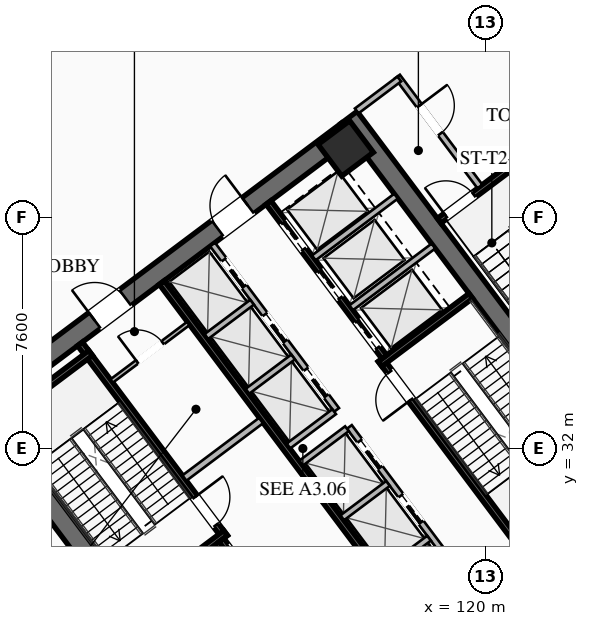
"""IFC4 building model, lengths in metres.
Left out: names, types, materials, properties, quantities, classifications, styles, units other than length and angle.
Written with IfcOpenShell. Run it as: python <this file> out.ifc"""

import sys

from ifc_helpers import new_model, si_unit, direction, frame, frame_2d, origin, origin_2d, place, context, subcontext, project, spatial, rectangle, hollow_rectangle, extrude, element, fill, save


model = new_model("IFC4")
c1 = context("Model", 3, precision=1e-05, world=origin(), true_north=direction((0.0, 1.0)))
c2 = subcontext(c1, "Body", "Model", "MODEL_VIEW")
j1 = project(units=[si_unit("LENGTHUNIT", "METRE"), si_unit("PLANEANGLEUNIT", "RADIAN")], contexts=[c1])
p1 = place(None, origin())
s1 = spatial("IfcSite", under=j1, at=p1, CompositionType="ELEMENT")
p2 = place(p1, origin())
s2 = spatial("IfcBuilding", under=s1, at=p2, CompositionType="ELEMENT")
p3 = place(p2, origin())
s3 = spatial("IfcBuildingStorey", under=s2, at=p3, CompositionType="ELEMENT", Elevation=0.0)
for number, where, z_axis, x_axis in (
    (1, (112.476, 21.107, 0.0), (0.0, 0.0, 1.0), (-0.6, 0.8, 0.0)),
    (2, (115.524, 42.893, 0.0), (0.0, 0.0, 1.0), (0.6, -0.8, 0.0)),
):
    element("IfcWall", number, at=place(p3, frame(where, z_axis=z_axis, x_axis=x_axis)), inside=s3, PredefinedType="SHEAR", context=c2, shape_type="SweptSolid", body=[
        extrude(rectangle(XDim=15.6, YDim=0.65, at=frame_2d((7.8, 0.0))), origin(), (0.0, 0.0, 1.0), 5.4),
    ])
p4 = place(p3, frame((124.429, 30.478, 0.0), z_axis=(0.0, 0.0, 1.0), x_axis=(-0.799998028465, -0.600002628705, 0.0)))
e3 = element("IfcWall", 3, at=p4, inside=s3, PredefinedType="SHEAR", context=c2, shape_type="SweptSolid", body=[
    extrude(rectangle(XDim=14.86, YDim=0.65, at=frame_2d((7.43, 0.0))), origin(), (0.0, 0.0, 1.0), 5.4),
])
p5 = place(p4, frame((9.13, 0.0, 0.0)))
e4 = element("IfcOpeningElement", 4, at=p5, cuts=e3, PredefinedType="OPENING", context=c2, shape_type="SweptSolid", body=[
    extrude(rectangle(XDim=1.25, YDim=2.25, at=frame_2d((0.625, 1.125))), frame((0.0, 0.335, 0.0), z_axis=(0.0, -1.0, 0.0), x_axis=(1.0, 0.0, 0.0)), (0.0, 0.0, 1.0), 0.67),
])
p6 = place(p4, frame((4.08, 0.0, 0.0)))
e5 = element("IfcOpeningElement", 5, at=p6, cuts=e3, PredefinedType="OPENING", context=c2, shape_type="SweptSolid", body=[
    extrude(rectangle(XDim=1.25, YDim=2.25, at=frame_2d((0.625, 1.125))), frame((0.0, 0.335, 0.0), z_axis=(0.0, -1.0, 0.0), x_axis=(1.0, 0.0, 0.0)), (0.0, 0.0, 1.0), 0.67),
])
p7 = place(p3, frame((103.571, 33.522, 0.0), z_axis=(0.0, 0.0, 1.0), x_axis=(0.799998028465, 0.600002628705, 0.0)))
e6 = element("IfcWall", 6, at=p7, inside=s3, PredefinedType="SHEAR", context=c2, shape_type="SweptSolid", body=[
    extrude(rectangle(XDim=14.86, YDim=0.65, at=frame_2d((7.43, 0.0))), origin(), (0.0, 0.0, 1.0), 5.4),
])
p8 = place(p7, frame((4.48, 0.0, 0.0)))
e7 = element("IfcOpeningElement", 7, at=p8, cuts=e6, PredefinedType="OPENING", context=c2, shape_type="SweptSolid", body=[
    extrude(rectangle(XDim=1.25, YDim=2.25, at=frame_2d((0.625, 1.125))), frame((0.0, 0.335, 0.0), z_axis=(0.0, -1.0, 0.0), x_axis=(1.0, 0.0, 0.0)), (0.0, 0.0, 1.0), 0.67),
])
p9 = place(p7, frame((9.53, 0.0, 0.0)))
e8 = element("IfcOpeningElement", 8, at=p9, cuts=e6, PredefinedType="OPENING", context=c2, shape_type="SweptSolid", body=[
    extrude(rectangle(XDim=1.25, YDim=2.25, at=frame_2d((0.625, 1.125))), frame((0.0, 0.335, 0.0), z_axis=(0.0, -1.0, 0.0), x_axis=(1.0, 0.0, 0.0)), (0.0, 0.0, 1.0), 0.67),
])
p10 = place(p3, frame((115.41, 41.87, 0.0), z_axis=(0.0, 0.0, 1.0), x_axis=(0.799999996291, 0.600000004945, 0.0)))
e9 = element("IfcColumn", 9, at=p10, inside=s3, PredefinedType="COLUMN", context=c2, shape_type="SweptSolid", body=[
    extrude(hollow_rectangle(XDim=1.3, YDim=1.3, WallThickness=0.05, at=origin_2d()), origin(), (0.0, 0.0, 1.0), 5.14),
])
p11 = place(p3, frame((106.67, 35.44, 0.0), z_axis=(0.0, 0.0, 1.0), x_axis=(0.600009827119, -0.799992629566, 0.0)))
e10 = element("IfcWall", 10, at=p11, inside=s3, PredefinedType="SHEAR", context=c2, shape_type="SweptSolid", body=[
    extrude(rectangle(XDim=7.95, YDim=0.2, at=frame_2d((3.975, 0.0))), origin(), (0.0, 0.0, 1.0), 5.14),
])
p12 = place(p11, frame((6.3, 0.0, 0.0)))
e11 = element("IfcOpeningElement", 11, at=p12, cuts=e10, PredefinedType="OPENING", context=c2, shape_type="SweptSolid", body=[
    extrude(rectangle(XDim=1.15, YDim=2.2, at=frame_2d((0.575, 1.1))), frame((0.0, 0.11, 0.0), z_axis=(0.0, -1.0, 0.0), x_axis=(1.0, 0.0, 0.0)), (0.0, 0.0, 1.0), 0.22),
])
for number, where, z_axis, x_axis in (
    (12, (108.476, 26.982, 0.0), (0.0, 0.0, 1.0), (0.8, 0.6, 0.0)),
    (13, (104.036, 32.902, 0.0), (0.0, 0.0, 1.0), (0.8, 0.6, 0.0)),
):
    element("IfcWall", number, at=place(p3, frame(where, z_axis=z_axis, x_axis=x_axis)), inside=s3, PredefinedType="SHEAR", context=c2, shape_type="SweptSolid", body=[
        extrude(rectangle(XDim=3.73, YDim=0.2, at=frame_2d((1.865, 0.0))), origin(), (0.0, 0.0, 1.0), 5.14),
    ])
p13 = place(p3, frame((121.33, 28.56, 0.0), z_axis=(0.0, 0.0, 1.0), x_axis=(-0.600009827119, 0.799992629566, 0.0)))
e14 = element("IfcWall", 14, at=p13, inside=s3, PredefinedType="SHEAR", context=c2, shape_type="SweptSolid", body=[
    extrude(rectangle(XDim=7.95, YDim=0.2, at=frame_2d((3.975, 0.0))), origin(), (0.0, 0.0, 1.0), 5.14),
])
p14 = place(p13, frame((6.3, 0.0, 0.0)))
e15 = element("IfcOpeningElement", 15, at=p14, cuts=e14, PredefinedType="OPENING", context=c2, shape_type="SweptSolid", body=[
    extrude(rectangle(XDim=1.15, YDim=2.2, at=frame_2d((0.575, 1.1))), frame((0.0, 0.11, 0.0), z_axis=(0.0, -1.0, 0.0), x_axis=(1.0, 0.0, 0.0)), (0.0, 0.0, 1.0), 0.22),
])
p15 = place(p3, frame((116.54, 34.78, 0.0), z_axis=(0.0, 0.0, 1.0), x_axis=(0.799984290658, 0.600020945218, 0.0)))
e16 = element("IfcWall", 16, at=p15, inside=s3, PredefinedType="SHEAR", context=c2, shape_type="SweptSolid", body=[
    extrude(rectangle(XDim=3.73, YDim=0.2, at=frame_2d((1.865, 0.0))), origin(), (0.0, 0.0, 1.0), 5.14),
])
p16 = place(p3, frame((117.938, 26.016, 0.0), z_axis=(0.0, 0.0, 1.0), x_axis=(-0.600005463273, 0.799995902516, 0.0)))
e17 = element("IfcWall", 17, at=p16, inside=s3, PredefinedType="SHEAR", context=c2, shape_type="SweptSolid", body=[
    extrude(rectangle(XDim=14.3, YDim=0.2, at=frame_2d((7.15, 0.0))), origin(), (0.0, 0.0, 1.0), 5.14),
])
p17 = place(p3, frame((110.104, 31.028, 0.0), z_axis=(0.0, 0.0, 1.0), x_axis=(0.800018601094, 0.59997519774, 0.0)))
e18 = element("IfcWall", 18, at=p17, inside=s3, PredefinedType="SOLIDWALL", context=c2, shape_type="SweptSolid", body=[
    extrude(rectangle(XDim=3.15, YDim=0.22, at=frame_2d((1.575, 0.0))), origin(), (0.0, 0.0, 1.0), 3.31),
])
p18 = place(p3, frame((115.13, 23.91, 0.0), z_axis=(0.0, 0.0, 1.0), x_axis=(-0.599975393228, 0.800018454488, 0.0)))
e19 = element("IfcWall", 19, at=p18, inside=s3, PredefinedType="SHEAR", context=c2, shape_type="SweptSolid", body=[
    extrude(rectangle(XDim=6.35, YDim=0.2, at=frame_2d((3.175, 0.0))), origin(), (0.0, 0.0, 1.0), 5.14),
])
p19 = place(p18, frame((4.775, 0.0, 0.0)))
e20 = element("IfcOpeningElement", 20, at=p19, cuts=e19, PredefinedType="OPENING", context=c2, shape_type="SweptSolid", body=[
    extrude(rectangle(XDim=1.3, YDim=2.25, at=frame_2d((0.65, 1.125))), frame((0.0, 0.11, 0.0), z_axis=(0.0, -1.0, 0.0), x_axis=(1.0, 0.0, 0.0)), (0.0, 0.0, 1.0), 0.22),
])
p20 = place(p18, frame((2.775, 0.0, 0.0)))
e21 = element("IfcOpeningElement", 21, at=p20, cuts=e19, PredefinedType="OPENING", context=c2, shape_type="SweptSolid", body=[
    extrude(rectangle(XDim=1.3, YDim=2.25, at=frame_2d((0.65, 1.125))), frame((0.0, 0.11, 0.0), z_axis=(0.0, -1.0, 0.0), x_axis=(1.0, 0.0, 0.0)), (0.0, 0.0, 1.0), 0.22),
])
p21 = place(p18, frame((0.575, 0.0, 0.0)))
e22 = element("IfcOpeningElement", 22, at=p21, cuts=e19, PredefinedType="OPENING", context=c2, shape_type="SweptSolid", body=[
    extrude(rectangle(XDim=1.3, YDim=2.25, at=frame_2d((0.65, 1.125))), frame((0.0, 0.11, 0.0), z_axis=(0.0, -1.0, 0.0), x_axis=(1.0, 0.0, 0.0)), (0.0, 0.0, 1.0), 0.22),
])
p22 = place(p3, frame((112.87, 40.09, 0.0), z_axis=(0.0, 0.0, 1.0), x_axis=(0.599975393228, -0.800018454488, 0.0)))
e23 = element("IfcWall", 23, at=p22, inside=s3, PredefinedType="SHEAR", context=c2, shape_type="SweptSolid", body=[
    extrude(rectangle(XDim=6.35, YDim=0.2, at=frame_2d((3.175, 0.0))), origin(), (0.0, 0.0, 1.0), 5.14),
])
p23 = place(p22, frame((4.875, 0.0, 0.0)))
e24 = element("IfcOpeningElement", 24, at=p23, cuts=e23, PredefinedType="OPENING", context=c2, shape_type="SweptSolid", body=[
    extrude(rectangle(XDim=1.1, YDim=2.2, at=frame_2d((0.55, 1.1))), frame((0.0, 0.11, 0.0), z_axis=(0.0, -1.0, 0.0), x_axis=(1.0, 0.0, 0.0)), (0.0, 0.0, 1.0), 0.22),
])
p24 = place(p22, frame((2.825, 0.0, 0.0)))
e25 = element("IfcOpeningElement", 25, at=p24, cuts=e23, PredefinedType="OPENING", context=c2, shape_type="SweptSolid", body=[
    extrude(rectangle(XDim=1.1, YDim=2.2, at=frame_2d((0.55, 1.1))), frame((0.0, 0.11, 0.0), z_axis=(0.0, -1.0, 0.0), x_axis=(1.0, 0.0, 0.0)), (0.0, 0.0, 1.0), 0.22),
])
p25 = place(p22, frame((0.825, 0.0, 0.0)))
e26 = element("IfcOpeningElement", 26, at=p25, cuts=e23, PredefinedType="OPENING", context=c2, shape_type="SweptSolid", body=[
    extrude(rectangle(XDim=1.1, YDim=2.2, at=frame_2d((0.55, 1.1))), frame((0.0, 0.11, 0.0), z_axis=(0.0, -1.0, 0.0), x_axis=(1.0, 0.0, 0.0)), (0.0, 0.0, 1.0), 0.22),
])
for number, where, z_axis, x_axis in (
    (27, (115.59, 36.63, 0.0), (0.0, 0.0, 1.0), (0.8, 0.6, 0.0)),
    (28, (114.36, 38.27, 0.0), (0.0, 0.0, 1.0), (0.8, 0.6, 0.0)),
):
    element("IfcWall", number, at=place(p3, frame(where, z_axis=z_axis, x_axis=x_axis)), inside=s3, PredefinedType="SOLIDWALL", context=c2, shape_type="SweptSolid", body=[
        extrude(rectangle(XDim=3.38, YDim=0.2, at=frame_2d((1.69, 0.0))), origin(), (0.0, 0.0, 1.0), 5.14),
    ])
p26 = place(p3, frame((107.71, 34.22, 0.0), z_axis=(0.0, 0.0, 1.0), x_axis=(0.799981399002, 0.60002480053, 0.0)))
e29 = element("IfcWall", 29, at=p26, inside=s3, PredefinedType="PARTITIONING", context=c2, shape_type="SweptSolid", body=[
    extrude(rectangle(XDim=3.15, YDim=0.135, at=frame_2d((1.575, 0.0))), origin(), (0.0, 0.0, 1.0), 3.31),
])
p27 = place(p26, frame((1.05, 0.0, 0.0)))
e30 = element("IfcOpeningElement", 30, at=p27, cuts=e29, PredefinedType="OPENING", context=c2, shape_type="SweptSolid", body=[
    extrude(rectangle(XDim=1.05, YDim=2.2, at=frame_2d((0.525, 1.1))), frame((0.0, 0.077, 0.0), z_axis=(0.0, -1.0, 0.0), x_axis=(1.0, 0.0, 0.0)), (0.0, 0.0, 1.0), 0.155),
])
p28 = place(p3, frame((119.61, 27.27, 0.0), z_axis=(0.0, 0.0, 1.0), x_axis=(-0.600011488909, 0.79999138319, 0.0)))
e31 = element("IfcWall", 31, at=p28, inside=s3, PredefinedType="SOLIDWALL", context=c2, shape_type="SweptSolid", body=[
    extrude(rectangle(XDim=6.8, YDim=0.2, at=frame_2d((3.4, 0.0))), origin(), (0.0, 0.0, 1.0), 5.14),
])
p29 = place(p28, frame((0.625, 0.0, 0.0)))
e32 = element("IfcOpeningElement", 32, at=p29, cuts=e31, PredefinedType="OPENING", context=c2, shape_type="SweptSolid", body=[
    extrude(rectangle(XDim=1.1, YDim=2.2, at=frame_2d((0.55, 1.1))), frame((0.0, 0.11, 0.0), z_axis=(0.0, -1.0, 0.0), x_axis=(1.0, 0.0, 0.0)), (0.0, 0.0, 1.0), 0.22),
])
p30 = place(p28, frame((2.875, 0.0, 0.0)))
e33 = element("IfcOpeningElement", 33, at=p30, cuts=e31, PredefinedType="OPENING", context=c2, shape_type="SweptSolid", body=[
    extrude(rectangle(XDim=1.1, YDim=2.2, at=frame_2d((0.55, 1.1))), frame((0.0, 0.11, 0.0), z_axis=(0.0, -1.0, 0.0), x_axis=(1.0, 0.0, 0.0)), (0.0, 0.0, 1.0), 0.22),
])
p31 = place(p28, frame((5.125, 0.0, 0.0)))
e34 = element("IfcOpeningElement", 34, at=p31, cuts=e31, PredefinedType="OPENING", context=c2, shape_type="SweptSolid", body=[
    extrude(rectangle(XDim=1.1, YDim=2.2, at=frame_2d((0.55, 1.1))), frame((0.0, 0.11, 0.0), z_axis=(0.0, -1.0, 0.0), x_axis=(1.0, 0.0, 0.0)), (0.0, 0.0, 1.0), 0.22),
])
p32 = place(p3, frame((116.646, 27.922, 0.0), z_axis=(0.0, 0.0, 1.0), x_axis=(0.8, 0.6, 0.0)))
e35 = element("IfcWall", 35, at=p32, inside=s3, PredefinedType="SOLIDWALL", context=c2, shape_type="SweptSolid", body=[
    extrude(rectangle(XDim=1.88, YDim=0.2, at=frame_2d((0.94, 0.0))), origin(), (0.0, 0.0, 1.0), 5.14),
])
p33 = place(p3, frame((115.296, 29.722, 0.0), z_axis=(0.0, 0.0, 1.0), x_axis=(0.799984418148, 0.600020775241, 0.0)))
e36 = element("IfcWall", 36, at=p33, inside=s3, PredefinedType="SOLIDWALL", context=c2, shape_type="SweptSolid", body=[
    extrude(rectangle(XDim=1.88, YDim=0.2, at=frame_2d((0.94, 0.0))), origin(), (0.0, 0.0, 1.0), 5.14),
])
p34 = place(p3, frame((113.946, 31.522, 0.0), z_axis=(0.0, 0.0, 1.0), x_axis=(0.8, 0.6, 0.0)))
e37 = element("IfcWall", 37, at=p34, inside=s3, PredefinedType="SOLIDWALL", context=c2, shape_type="SweptSolid", body=[
    extrude(rectangle(XDim=1.88, YDim=0.2, at=frame_2d((0.94, 0.0))), origin(), (0.0, 0.0, 1.0), 5.14),
])
p35 = place(p3, frame((115.11, 33.27, 0.0), z_axis=(0.0, 0.0, 1.0), x_axis=(-0.600011488909, 0.79999138319, 0.0)))
e38 = element("IfcWall", 38, at=p35, inside=s3, PredefinedType="SOLIDWALL", context=c2, shape_type="SweptSolid", body=[
    extrude(rectangle(XDim=6.8, YDim=0.2, at=frame_2d((3.4, 0.0))), origin(), (0.0, 0.0, 1.0), 5.14),
])
p36 = place(p35, frame((0.575, 0.0, 0.0)))
e39 = element("IfcOpeningElement", 39, at=p36, cuts=e38, PredefinedType="OPENING", context=c2, shape_type="SweptSolid", body=[
    extrude(rectangle(XDim=1.1, YDim=2.2, at=frame_2d((0.55, 1.1))), frame((0.0, 0.11, 0.0), z_axis=(0.0, -1.0, 0.0), x_axis=(1.0, 0.0, 0.0)), (0.0, 0.0, 1.0), 0.22),
])
p37 = place(p35, frame((2.825, 0.0, 0.0)))
e40 = element("IfcOpeningElement", 40, at=p37, cuts=e38, PredefinedType="OPENING", context=c2, shape_type="SweptSolid", body=[
    extrude(rectangle(XDim=1.1, YDim=2.2, at=frame_2d((0.55, 1.1))), frame((0.0, 0.11, 0.0), z_axis=(0.0, -1.0, 0.0), x_axis=(1.0, 0.0, 0.0)), (0.0, 0.0, 1.0), 0.22),
])
p38 = place(p35, frame((5.075, 0.0, 0.0)))
e41 = element("IfcOpeningElement", 41, at=p38, cuts=e38, PredefinedType="OPENING", context=c2, shape_type="SweptSolid", body=[
    extrude(rectangle(XDim=1.1, YDim=2.2, at=frame_2d((0.55, 1.1))), frame((0.0, 0.11, 0.0), z_axis=(0.0, -1.0, 0.0), x_axis=(1.0, 0.0, 0.0)), (0.0, 0.0, 1.0), 0.22),
])
p39 = place(p3, frame((113.526, 32.082, 0.0), z_axis=(0.0, 0.0, 1.0), x_axis=(0.800046745961, 0.599937666993, 0.0)))
e42 = element("IfcWall", 42, at=p39, inside=s3, PredefinedType="SOLIDWALL", context=c2, shape_type="SweptSolid", body=[
    extrude(rectangle(XDim=1.88, YDim=0.2, at=frame_2d((0.94, 0.0))), origin(), (0.0, 0.0, 1.0), 5.14),
])
p40 = place(p3, frame((112.176, 33.882, 0.0), z_axis=(0.0, 0.0, 1.0), x_axis=(0.8, 0.6, 0.0)))
e43 = element("IfcWall", 43, at=p40, inside=s3, PredefinedType="SOLIDWALL", context=c2, shape_type="SweptSolid", body=[
    extrude(rectangle(XDim=1.88, YDim=0.2, at=frame_2d((0.94, 0.0))), origin(), (0.0, 0.0, 1.0), 5.14),
])
p41 = place(p3, frame((110.826, 35.682, 0.0), z_axis=(0.0, 0.0, 1.0), x_axis=(0.799984418148, 0.600020775241, 0.0)))
e44 = element("IfcWall", 44, at=p41, inside=s3, PredefinedType="SOLIDWALL", context=c2, shape_type="SweptSolid", body=[
    extrude(rectangle(XDim=1.88, YDim=0.2, at=frame_2d((0.94, 0.0))), origin(), (0.0, 0.0, 1.0), 5.14),
])
p42 = place(p3, frame((118.484, 39.488, 0.0), z_axis=(0.0, 0.0, 1.0), x_axis=(0.800017232136, 0.599977023131, 0.0)))
e45 = element("IfcWall", 45, at=p42, inside=s3, PredefinedType="SHEAR", context=c2, shape_type="SweptSolid", body=[
    extrude(rectangle(XDim=3.4, YDim=0.2, at=frame_2d((1.7, 0.0))), origin(), (0.0, 0.0, 1.0), 5.14),
])
p43 = place(p42, frame((0.275, 0.0, 0.0)))
e46 = element("IfcOpeningElement", 46, at=p43, cuts=e45, PredefinedType="OPENING", context=c2, shape_type="SweptSolid", body=[
    extrude(rectangle(XDim=1.15, YDim=2.2, at=frame_2d((0.575, 1.1))), frame((0.0, 0.11, 0.0), z_axis=(0.0, -1.0, 0.0), x_axis=(1.0, 0.0, 0.0)), (0.0, 0.0, 1.0), 0.22),
])
p44 = place(p3, frame((117.112, 44.234, 0.0), z_axis=(0.0, 0.0, 1.0), x_axis=(0.59999135767, -0.800006481675, 0.0)))
e47 = element("IfcWall", 47, at=p44, inside=s3, PredefinedType="SOLIDWALL", context=c2, shape_type="SweptSolid", body=[
    extrude(rectangle(XDim=4.52, YDim=0.2, at=frame_2d((2.26, 0.0))), origin(), (0.0, 0.0, 1.0), 3.31),
])
p45 = place(p44, frame((1.2, 0.0, 0.0)))
e48 = element("IfcOpeningElement", 48, at=p45, cuts=e47, PredefinedType="OPENING", context=c2, shape_type="SweptSolid", body=[
    extrude(rectangle(XDim=1.15, YDim=2.2, at=frame_2d((0.575, 1.1))), frame((0.0, 0.11, 0.0), z_axis=(0.0, -1.0, 0.0), x_axis=(1.0, 0.0, 0.0)), (0.0, 0.0, 1.0), 0.22),
])
p46 = place(p3, frame((115.772, 43.104, 0.0), z_axis=(0.0, 0.0, 1.0), x_axis=(0.800016739359, 0.599977680206, 0.0)))
e49 = element("IfcWall", 49, at=p46, inside=s3, PredefinedType="SOLIDWALL", context=c2, shape_type="SweptSolid", body=[
    extrude(rectangle(XDim=1.75, YDim=0.2, at=frame_2d((0.875, 0.0))), origin(), (0.0, 0.0, 1.0), 3.31),
])
p47 = place(p8, origin())
e50 = element("IfcDoor", 50, at=p47, inside=s3, OperationType="SINGLE_SWING_LEFT", PredefinedType="DOOR", context=c2, shape_type="SweptSolid", body=[
    extrude(rectangle(XDim=1.25, YDim=2.25, at=frame_2d((0.625, 1.125))), frame((0.0, 0.025, 0.0), z_axis=(0.0, -1.0, 0.0), x_axis=(1.0, 0.0, 0.0)), (0.0, 0.0, 1.0), 0.05),
])
fill(e7, e50)
p48 = place(p9, origin())
e51 = element("IfcDoor", 51, at=p48, inside=s3, OperationType="SINGLE_SWING_RIGHT", PredefinedType="DOOR", context=c2, shape_type="SweptSolid", body=[
    extrude(rectangle(XDim=1.25, YDim=2.25, at=frame_2d((0.625, 1.125))), frame((0.0, 0.025, 0.0), z_axis=(0.0, -1.0, 0.0), x_axis=(1.0, 0.0, 0.0)), (0.0, 0.0, 1.0), 0.05),
])
fill(e8, e51)
p49 = place(p12, origin())
e52 = element("IfcDoor", 52, at=p49, inside=s3, OperationType="SINGLE_SWING_LEFT", PredefinedType="DOOR", context=c2, shape_type="SweptSolid", body=[
    extrude(rectangle(XDim=1.15, YDim=2.2, at=frame_2d((0.575, 1.1))), frame((0.0, 0.025, 0.0), z_axis=(0.0, -1.0, 0.0), x_axis=(1.0, 0.0, 0.0)), (0.0, 0.0, 1.0), 0.05),
])
fill(e11, e52)
p50 = place(p14, origin())
e53 = element("IfcDoor", 53, at=p50, inside=s3, OperationType="SINGLE_SWING_LEFT", PredefinedType="DOOR", context=c2, shape_type="SweptSolid", body=[
    extrude(rectangle(XDim=1.15, YDim=2.2, at=frame_2d((0.575, 1.1))), frame((0.0, 0.025, 0.0), z_axis=(0.0, -1.0, 0.0), x_axis=(1.0, 0.0, 0.0)), (0.0, 0.0, 1.0), 0.05),
])
fill(e15, e53)
p51 = place(p27, origin())
e54 = element("IfcDoor", 54, at=p51, inside=s3, OperationType="SINGLE_SWING_LEFT", PredefinedType="DOOR", context=c2, shape_type="SweptSolid", body=[
    extrude(rectangle(XDim=1.05, YDim=2.2, at=frame_2d((0.525, 1.1))), frame((0.0, 0.025, 0.0), z_axis=(0.0, -1.0, 0.0), x_axis=(1.0, 0.0, 0.0)), (0.0, 0.0, 1.0), 0.05),
])
fill(e30, e54)
p52 = place(p43, origin())
e55 = element("IfcDoor", 55, at=p52, inside=s3, OperationType="SINGLE_SWING_LEFT", PredefinedType="DOOR", context=c2, shape_type="SweptSolid", body=[
    extrude(rectangle(XDim=1.15, YDim=2.2, at=frame_2d((0.575, 1.1))), frame((0.0, 0.025, 0.0), z_axis=(0.0, -1.0, 0.0), x_axis=(1.0, 0.0, 0.0)), (0.0, 0.0, 1.0), 0.05),
])
fill(e46, e55)
p53 = place(p45, origin())
e56 = element("IfcDoor", 56, at=p53, inside=s3, OperationType="SINGLE_SWING_LEFT", PredefinedType="DOOR", context=c2, shape_type="SweptSolid", body=[
    extrude(rectangle(XDim=1.15, YDim=2.2, at=frame_2d((0.575, 1.1))), frame((0.0, 0.025, 0.0), z_axis=(0.0, -1.0, 0.0), x_axis=(1.0, 0.0, 0.0)), (0.0, 0.0, 1.0), 0.05),
])
fill(e48, e56)
p54 = place(p30, origin())
e57 = element("IfcDoor", 57, at=p54, inside=s3, OperationType="SLIDING_TO_LEFT", PredefinedType="DOOR", context=c2, shape_type="SweptSolid", body=[
    extrude(rectangle(XDim=1.1, YDim=2.2, at=frame_2d((0.55, 1.1))), frame((0.0, 0.025, 0.0), z_axis=(0.0, -1.0, 0.0), x_axis=(1.0, 0.0, 0.0)), (0.0, 0.0, 1.0), 0.05),
])
fill(e33, e57)
p55 = place(p31, origin())
e58 = element("IfcDoor", 58, at=p55, inside=s3, OperationType="SLIDING_TO_LEFT", PredefinedType="DOOR", context=c2, shape_type="SweptSolid", body=[
    extrude(rectangle(XDim=1.1, YDim=2.2, at=frame_2d((0.55, 1.1))), frame((0.0, 0.025, 0.0), z_axis=(0.0, -1.0, 0.0), x_axis=(1.0, 0.0, 0.0)), (0.0, 0.0, 1.0), 0.05),
])
fill(e34, e58)
p56 = place(p36, origin())
e59 = element("IfcDoor", 59, at=p56, inside=s3, OperationType="SLIDING_TO_LEFT", PredefinedType="DOOR", context=c2, shape_type="SweptSolid", body=[
    extrude(rectangle(XDim=1.1, YDim=2.2, at=frame_2d((0.55, 1.1))), frame((0.0, 0.025, 0.0), z_axis=(0.0, -1.0, 0.0), x_axis=(1.0, 0.0, 0.0)), (0.0, 0.0, 1.0), 0.05),
])
fill(e39, e59)
p57 = place(p37, origin())
e60 = element("IfcDoor", 60, at=p57, inside=s3, OperationType="SLIDING_TO_LEFT", PredefinedType="DOOR", context=c2, shape_type="SweptSolid", body=[
    extrude(rectangle(XDim=1.1, YDim=2.2, at=frame_2d((0.55, 1.1))), frame((0.0, 0.025, 0.0), z_axis=(0.0, -1.0, 0.0), x_axis=(1.0, 0.0, 0.0)), (0.0, 0.0, 1.0), 0.05),
])
fill(e40, e60)
p58 = place(p38, origin())
e61 = element("IfcDoor", 61, at=p58, inside=s3, OperationType="SLIDING_TO_LEFT", PredefinedType="DOOR", context=c2, shape_type="SweptSolid", body=[
    extrude(rectangle(XDim=1.1, YDim=2.2, at=frame_2d((0.55, 1.1))), frame((0.0, 0.025, 0.0), z_axis=(0.0, -1.0, 0.0), x_axis=(1.0, 0.0, 0.0)), (0.0, 0.0, 1.0), 0.05),
])
fill(e41, e61)
p59 = place(p23, origin())
e62 = element("IfcDoor", 62, at=p59, inside=s3, OperationType="SLIDING_TO_LEFT", PredefinedType="DOOR", context=c2, shape_type="SweptSolid", body=[
    extrude(rectangle(XDim=1.1, YDim=2.2, at=frame_2d((0.55, 1.1))), frame((0.0, 0.025, 0.0), z_axis=(0.0, -1.0, 0.0), x_axis=(1.0, 0.0, 0.0)), (0.0, 0.0, 1.0), 0.05),
])
fill(e24, e62)
p60 = place(p24, origin())
e63 = element("IfcDoor", 63, at=p60, inside=s3, OperationType="SLIDING_TO_LEFT", PredefinedType="DOOR", context=c2, shape_type="SweptSolid", body=[
    extrude(rectangle(XDim=1.1, YDim=2.2, at=frame_2d((0.55, 1.1))), frame((0.0, 0.025, 0.0), z_axis=(0.0, -1.0, 0.0), x_axis=(1.0, 0.0, 0.0)), (0.0, 0.0, 1.0), 0.05),
])
fill(e25, e63)
p61 = place(p25, origin())
e64 = element("IfcDoor", 64, at=p61, inside=s3, OperationType="SLIDING_TO_LEFT", PredefinedType="DOOR", context=c2, shape_type="SweptSolid", body=[
    extrude(rectangle(XDim=1.1, YDim=2.2, at=frame_2d((0.55, 1.1))), frame((0.0, 0.025, 0.0), z_axis=(0.0, -1.0, 0.0), x_axis=(1.0, 0.0, 0.0)), (0.0, 0.0, 1.0), 0.05),
])
fill(e26, e64)
save(model, sys.argv[1])
